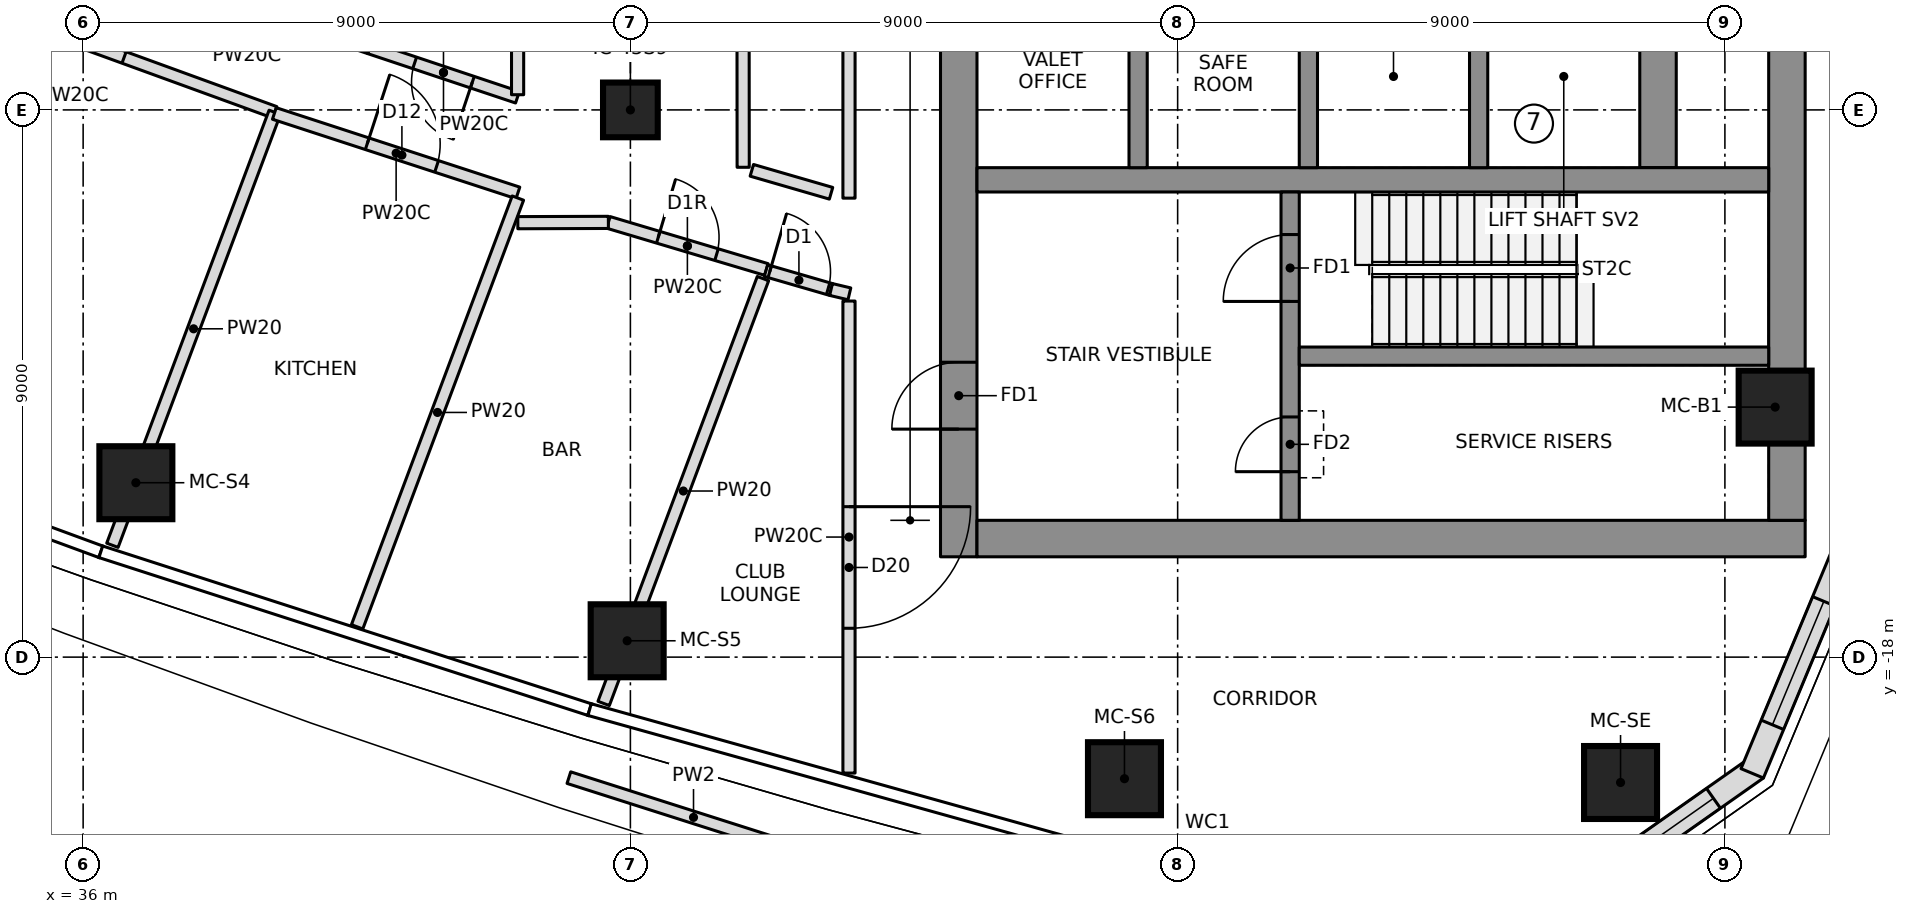
"""IFC4 building model, lengths in metres.
Left out: names, types, materials, properties, quantities, classifications, styles, units other than length and angle.
Written with IfcOpenShell. Run it as: python <this file> out.ifc"""

import sys

from ifc_helpers import new_model, si_unit, direction, frame, frame_2d, origin, origin_2d, place, context, subcontext, project, spatial, polyline, rectangle, outline, extrude, element, fill, save


model = new_model("IFC4")
c1 = context("Model", 3, precision=1e-05, world=origin(), true_north=direction((0.0, 1.0)))
c2 = subcontext(c1, "Body", "Model", "MODEL_VIEW")
j1 = project(units=[si_unit("LENGTHUNIT", "METRE"), si_unit("PLANEANGLEUNIT", "RADIAN")], contexts=[c1])
p1 = place(None, origin())
s1 = spatial("IfcSite", under=j1, at=p1, CompositionType="ELEMENT")
p2 = place(p1, origin())
s2 = spatial("IfcBuilding", under=s1, at=p2, CompositionType="ELEMENT")
p3 = place(p2, frame((0.0, 0.0, 216.2)))
s3 = spatial("IfcBuildingStorey", under=s2, at=p3, CompositionType="ELEMENT", Elevation=216.2)
p4 = place(p3, frame((50.4, -16.35, 0.0), z_axis=(0.0, 0.0, 1.0), x_axis=(0.0, 1.0, 0.0)))
e1 = element("IfcWall", 1, at=p4, inside=s3, PredefinedType="SHEAR", context=c2, shape_type="SweptSolid", body=[
    extrude(rectangle(XDim=9.7, YDim=0.6, at=frame_2d((4.85, 0.0))), origin(), (0.0, 0.0, 1.0), 4.6),
])
p5 = place(p4, frame((2.1, 0.0, 0.0)))
e2 = element("IfcOpeningElement", 2, at=p5, cuts=e1, PredefinedType="OPENING", context=c2, shape_type="SweptSolid", body=[
    extrude(rectangle(XDim=1.1, YDim=2.1, at=frame_2d((0.55, 1.05))), frame((0.0, 0.31, 0.0), z_axis=(0.0, -1.0, 0.0), x_axis=(1.0, 0.0, 0.0)), (0.0, 0.0, 1.0), 0.62),
])
p6 = place(p3, frame((50.7, -16.05, 0.0), z_axis=(0.0, 0.0, 1.0), x_axis=(1.0, 0.0, 0.0)))
e3 = element("IfcWall", 3, at=p6, inside=s3, PredefinedType="SHEAR", context=c2, shape_type="SweptSolid", body=[
    extrude(rectangle(XDim=13.62, YDim=0.6, at=frame_2d((6.81, 0.0))), origin(), (0.0, 0.0, 1.0), 4.6),
])
p7 = place(p3, frame((64.02, -15.75, 0.0), z_axis=(0.0, 0.0, 1.0), x_axis=(0.0, 1.0, 0.0)))
e4 = element("IfcWall", 4, at=p7, inside=s3, PredefinedType="SHEAR", context=c2, shape_type="SweptSolid", body=[
    extrude(rectangle(XDim=8.248, YDim=0.6, at=frame_2d((4.124, 0.0))), origin(), (0.0, 0.0, 1.0), 4.6),
])
p8 = place(p3, frame((61.9, -9.95, 0.0), z_axis=(0.0, 0.0, 1.0), x_axis=(0.0, 1.0, 0.0)))
e5 = element("IfcWall", 5, at=p8, inside=s3, PredefinedType="SHEAR", context=c2, shape_type="SweptSolid", body=[
    extrude(rectangle(XDim=19.9, YDim=0.6, at=frame_2d((9.95, 0.0))), origin(), (0.0, 0.0, 1.0), 4.6),
])
p9 = place(p3, frame((50.7, -10.15, 0.0), z_axis=(0.0, 0.0, 1.0), x_axis=(1.0, 0.0, 0.0)))
e6 = element("IfcWall", 6, at=p9, inside=s3, PredefinedType="SHEAR", context=c2, shape_type="SweptSolid", body=[
    extrude(rectangle(XDim=13.02, YDim=0.4, at=frame_2d((6.51, 0.0))), origin(), (0.0, 0.0, 1.0), 4.6),
])
for number, where, z_axis, x_axis in (
    (7, (53.35, -9.95, 0.0), (0.0, 0.0, 1.0), (0.0, 1.0, 0.0)),
    (8, (56.15, -9.95, 0.0), (0.0, 0.0, 1.0), (0.0, 1.0, 0.0)),
    (9, (58.95, -9.95, 0.0), (0.0, 0.0, 1.0), (0.0, 1.0, 0.0)),
):
    element("IfcWall", number, at=place(p3, frame(where, z_axis=z_axis, x_axis=x_axis)), inside=s3, PredefinedType="SHEAR", context=c2, shape_type="SweptSolid", body=[
        extrude(rectangle(XDim=3.0, YDim=0.3, at=frame_2d((1.5, 0.0))), origin(), (0.0, 0.0, 1.0), 4.6),
    ])
p10 = place(p3, frame((55.85, -15.75, 0.0), z_axis=(0.0, 0.0, 1.0), x_axis=(0.0, 1.0, 0.0)))
e10 = element("IfcWall", 10, at=p10, inside=s3, PredefinedType="SHEAR", context=c2, shape_type="SweptSolid", body=[
    extrude(rectangle(XDim=5.4, YDim=0.3, at=frame_2d((2.7, 0.0))), origin(), (0.0, 0.0, 1.0), 4.6),
])
p11 = place(p10, frame((3.6, 0.0, 0.0)))
e11 = element("IfcOpeningElement", 11, at=p11, cuts=e10, PredefinedType="OPENING", context=c2, shape_type="SweptSolid", body=[
    extrude(rectangle(XDim=1.1, YDim=2.1, at=frame_2d((0.55, 1.05))), frame((0.0, 0.16, 0.0), z_axis=(0.0, -1.0, 0.0), x_axis=(1.0, 0.0, 0.0)), (0.0, 0.0, 1.0), 0.32),
])
p12 = place(p10, frame((0.8, 0.0, 0.0)))
e12 = element("IfcOpeningElement", 12, at=p12, cuts=e10, PredefinedType="OPENING", context=c2, shape_type="SweptSolid", body=[
    extrude(rectangle(XDim=0.9, YDim=2.1, at=frame_2d((0.45, 1.05))), frame((0.0, 0.16, 0.0), z_axis=(0.0, -1.0, 0.0), x_axis=(1.0, 0.0, 0.0)), (0.0, 0.0, 1.0), 0.32),
])
p13 = place(p3, frame((56.0, -13.05, 0.0), z_axis=(0.0, 0.0, 1.0), x_axis=(1.0, 0.0, 0.0)))
e13 = element("IfcWall", 13, at=p13, inside=s3, PredefinedType="SHEAR", context=c2, shape_type="SweptSolid", body=[
    extrude(rectangle(XDim=7.72, YDim=0.3, at=frame_2d((3.86, 0.0))), origin(), (0.0, 0.0, 1.0), 4.6),
])
for number, where, z_axis, x_axis in (
    (14, (36.867, -15.132, 0.0), (0.0, 0.0, 1.0), (1.0, 0.0, 0.0)),
    (15, (44.947, -17.731, 0.0), (0.0, 0.0, 1.0), (1.0, 0.0, 0.0)),
    (16, (53.125, -20.0, 0.0), (0.0, 0.0, 1.0), (1.0, 0.0, 0.0)),
    (17, (61.284, -20.062, 0.0), (0.0, 0.0, 1.0), (1.0, 0.0, 0.0)),
    (18, (63.826, -13.888, 0.0), (0.0, 0.0, 1.0), (1.0, 0.0, 0.0)),
):
    element("IfcColumn", number, at=place(p3, frame(where, z_axis=z_axis, x_axis=x_axis)), inside=s3, PredefinedType="COLUMN", context=c2, shape_type="SweptSolid", body=[
        extrude(rectangle(XDim=1.2, YDim=1.2, at=origin_2d()), origin(), (0.0, 0.0, 1.0), 4.6),
    ])
p14 = place(p3, frame((45.0, -9.0, 0.0), z_axis=(0.0, 0.0, 1.0), x_axis=(1.0, 0.0, 0.0)))
e19 = element("IfcColumn", 19, at=p14, inside=s3, PredefinedType="COLUMN", context=c2, shape_type="SweptSolid", body=[
    extrude(rectangle(XDim=0.9, YDim=0.9, at=origin_2d()), origin(), (0.0, 0.0, 1.0), 4.6),
])
p15 = place(p3, frame((60.352, -22.052, 0.0), z_axis=(0.0, 0.0, 1.0), x_axis=(0.817942545532, 0.575299915009, 0.0)))
e20 = element("IfcWall", 20, at=p15, inside=s3, PredefinedType="NOTDEFINED", context=c2, shape_type="SweptSolid", body=[
    extrude(outline(polyline([(-0.058, -0.2), (3.871, -0.2), (3.756, 0.2), (0.058, 0.2), (-0.058, -0.2)])), origin(), (0.0, 0.0, 1.0), 4.3),
])
p16 = place(p15, frame((0.807, 0.0, 0.6)))
e21 = element("IfcOpeningElement", 21, at=p16, cuts=e20, PredefinedType="OPENING", context=c2, shape_type="SweptSolid", body=[
    extrude(outline(polyline([(0.0, 1.35), (0.084, 1.771), (0.322, 2.128), (0.679, 2.366), (1.1, 2.45), (1.521, 2.366), (1.878, 2.128), (2.116, 1.771), (2.2, 1.35), (2.2, 1.1), (2.116, 0.679), (1.878, 0.322), (1.521, 0.084), (1.1, 0.0), (0.679, 0.084), (0.322, 0.322), (0.084, 0.679), (0.0, 1.1), (0.0, 1.35)])), frame((0.0, 0.21, 0.0), z_axis=(0.0, -1.0, 0.0), x_axis=(1.0, 0.0, 0.0)), (0.0, 0.0, 1.0), 0.42),
])
p17 = place(p3, frame((63.471, -19.858, 0.0), z_axis=(0.0, 0.0, 1.0), x_axis=(0.3844335483, 0.923152667191, 0.0)))
e22 = element("IfcWall", 22, at=p17, inside=s3, PredefinedType="NOTDEFINED", context=c2, shape_type="SweptSolid", body=[
    extrude(outline(polyline([(-0.058, -0.2), (3.843, -0.2), (3.784, 0.2), (0.058, 0.2), (-0.058, -0.2)])), origin(), (0.0, 0.0, 1.0), 4.3),
])
p18 = place(p17, frame((0.807, 0.0, 0.6)))
e23 = element("IfcOpeningElement", 23, at=p18, cuts=e22, PredefinedType="OPENING", context=c2, shape_type="SweptSolid", body=[
    extrude(outline(polyline([(0.0, 1.35), (0.084, 1.771), (0.322, 2.128), (0.679, 2.366), (1.1, 2.45), (1.521, 2.366), (1.878, 2.128), (2.116, 1.771), (2.2, 1.35), (2.2, 1.1), (2.116, 0.679), (1.878, 0.322), (1.521, 0.084), (1.1, 0.0), (0.679, 0.084), (0.322, 0.322), (0.084, 0.679), (0.0, 1.1), (0.0, 1.35)])), frame((0.0, 0.21, 0.0), z_axis=(0.0, -1.0, 0.0), x_axis=(1.0, 0.0, 0.0)), (0.0, 0.0, 1.0), 0.42),
])
p19 = place(p3, frame((43.988, -19.982, 0.0), z_axis=(0.0, 0.0, 1.0), x_axis=(0.952727369543, -0.303826528341, 0.0)))
e24 = element("IfcWall", 24, at=p19, inside=s3, PredefinedType="PARAPET", context=c2, shape_type="SweptSolid", body=[
    extrude(rectangle(XDim=4.303, YDim=0.2, at=frame_2d((2.151, 0.0))), origin(), (0.0, 0.0, 1.0), 1.1),
])
p20 = place(p3, frame((31.176, -6.137, 0.0), z_axis=(0.0, 0.0, 1.0), x_axis=(0.939697645913, -0.342006336585, 0.0)))
e25 = element("IfcWall", 25, at=p20, inside=s3, PredefinedType="PARTITIONING", context=c2, shape_type="SweptSolid", body=[
    extrude(rectangle(XDim=8.488, YDim=0.2, at=frame_2d((4.244, 0.0))), origin(), (0.0, 0.0, 1.0), 4.3),
])
p21 = place(p20, frame((3.85, 0.0, 0.0)))
e26 = element("IfcOpeningElement", 26, at=p21, cuts=e25, PredefinedType="OPENING", context=c2, shape_type="SweptSolid", body=[
    extrude(rectangle(XDim=2.0, YDim=2.4, at=frame_2d((1.0, 1.2))), frame((0.0, 0.11, 0.0), z_axis=(0.0, -1.0, 0.0), x_axis=(1.0, 0.0, 0.0)), (0.0, 0.0, 1.0), 0.22),
])
p22 = place(p3, frame((36.481, -16.161, 0.0), z_axis=(0.0, 0.0, 1.0), x_axis=(0.351133995718, 0.936325219703, 0.0)))
e27 = element("IfcWall", 27, at=p22, inside=s3, PredefinedType="PARTITIONING", context=c2, shape_type="SweptSolid", body=[
    extrude(rectangle(XDim=7.605, YDim=0.2, at=frame_2d((3.803, 0.0))), origin(), (0.0, 0.0, 1.0), 4.3),
])
p23 = place(p3, frame((39.145, -9.059, 0.0), z_axis=(0.0, 0.0, 1.0), x_axis=(0.950709044073, -0.310084365161, 0.0)))
e28 = element("IfcWall", 28, at=p23, inside=s3, PredefinedType="PARTITIONING", context=c2, shape_type="SweptSolid", body=[
    extrude(rectangle(XDim=4.213, YDim=0.2, at=frame_2d((2.106, 0.0))), origin(), (0.0, 0.0, 1.0), 4.3),
])
p24 = place(p23, frame((1.607, 0.0, 0.0)))
e29 = element("IfcOpeningElement", 29, at=p24, cuts=e28, PredefinedType="OPENING", context=c2, shape_type="SweptSolid", body=[
    extrude(rectangle(XDim=1.2, YDim=2.1, at=frame_2d((0.6, 1.05))), frame((0.0, 0.11, 0.0), z_axis=(0.0, -1.0, 0.0), x_axis=(1.0, 0.0, 0.0)), (0.0, 0.0, 1.0), 0.22),
])
p25 = place(p3, frame((40.506, -17.501, 0.0), z_axis=(0.0, 0.0, 1.0), x_axis=(0.351119888923, 0.936330509811, 0.0)))
e30 = element("IfcWall", 30, at=p25, inside=s3, PredefinedType="PARTITIONING", context=c2, shape_type="SweptSolid", body=[
    extrude(rectangle(XDim=7.531, YDim=0.2, at=frame_2d((3.766, 0.0))), origin(), (0.0, 0.0, 1.0), 4.3),
])
p26 = place(p3, frame((44.638, -10.85, 0.0), z_axis=(0.0, 0.0, 1.0), x_axis=(0.95835737874, -0.285571592801, 0.0)))
e31 = element("IfcWall", 31, at=p26, inside=s3, PredefinedType="PARTITIONING", context=c2, shape_type="SweptSolid", body=[
    extrude(rectangle(XDim=2.712, YDim=0.2, at=frame_2d((1.356, 0.0))), origin(), (0.0, 0.0, 1.0), 4.3),
])
p27 = place(p26, frame((0.856, 0.0, 0.0)))
e32 = element("IfcOpeningElement", 32, at=p27, cuts=e31, PredefinedType="OPENING", context=c2, shape_type="SweptSolid", body=[
    extrude(rectangle(XDim=1.0, YDim=2.1, at=frame_2d((0.5, 1.05))), frame((0.0, 0.11, 0.0), z_axis=(0.0, -1.0, 0.0), x_axis=(1.0, 0.0, 0.0)), (0.0, 0.0, 1.0), 0.22),
])
p28 = place(p3, frame((44.56, -18.762, 0.0), z_axis=(0.0, 0.0, 1.0), x_axis=(0.351109100247, 0.936334555447, 0.0)))
e33 = element("IfcWall", 33, at=p28, inside=s3, PredefinedType="PARTITIONING", context=c2, shape_type="SweptSolid", body=[
    extrude(rectangle(XDim=7.462, YDim=0.2, at=frame_2d((3.731, 0.0))), origin(), (0.0, 0.0, 1.0), 4.3),
])
p29 = place(p3, frame((40.709, -7.979, 0.0), z_axis=(0.0, 0.0, 1.0), x_axis=(-0.94846740352, 0.316874714137, 0.0)))
e34 = element("IfcWall", 34, at=p29, inside=s3, PredefinedType="PARTITIONING", context=c2, shape_type="SweptSolid", body=[
    extrude(rectangle(XDim=1.472, YDim=0.2, at=frame_2d((0.736, 0.0))), origin(), (0.0, 0.0, 1.0), 4.3),
])
p30 = place(p3, frame((43.143, -8.792, 0.0), z_axis=(0.0, 0.0, 1.0), x_axis=(-0.948473756095, 0.316855699016, 0.0)))
e35 = element("IfcWall", 35, at=p30, inside=s3, PredefinedType="PARTITIONING", context=c2, shape_type="SweptSolid", body=[
    extrude(rectangle(XDim=2.566, YDim=0.2, at=frame_2d((1.283, 0.0))), origin(), (0.0, 0.0, 1.0), 4.3),
])
p31 = place(p30, frame((0.783, 0.0, 0.0)))
e36 = element("IfcOpeningElement", 36, at=p31, cuts=e35, PredefinedType="OPENING", context=c2, shape_type="SweptSolid", body=[
    extrude(rectangle(XDim=1.0, YDim=2.1, at=frame_2d((0.5, 1.05))), frame((0.0, 0.11, 0.0), z_axis=(0.0, -1.0, 0.0), x_axis=(1.0, 0.0, 0.0)), (0.0, 0.0, 1.0), 0.22),
])
p32 = place(p3, frame((47.23, -11.643, 0.0), z_axis=(0.0, 0.0, 1.0), x_axis=(0.960450233741, -0.278451698696, 0.0)))
e37 = element("IfcWall", 37, at=p32, inside=s3, PredefinedType="PARTITIONING", context=c2, shape_type="SweptSolid", body=[
    extrude(rectangle(XDim=1.115, YDim=0.2, at=frame_2d((0.557, 0.0))), origin(), (0.0, 0.0, 1.0), 4.3),
])
p33 = place(p32, frame((0.064, 0.0, 0.0)))
e38 = element("IfcOpeningElement", 38, at=p33, cuts=e37, PredefinedType="OPENING", context=c2, shape_type="SweptSolid", body=[
    extrude(rectangle(XDim=1.0, YDim=2.1, at=frame_2d((0.5, 1.05))), frame((0.0, 0.11, 0.0), z_axis=(0.0, -1.0, 0.0), x_axis=(1.0, 0.0, 0.0)), (0.0, 0.0, 1.0), 0.22),
])
p34 = place(p3, frame((48.3, -10.371, 0.0), z_axis=(0.0, 0.0, 1.0), x_axis=(-0.960450321583, 0.278451395706, 0.0)))
e39 = element("IfcWall", 39, at=p34, inside=s3, PredefinedType="PARTITIONING", context=c2, shape_type="SweptSolid", body=[
    extrude(rectangle(XDim=1.356, YDim=0.2, at=frame_2d((0.678, 0.0))), origin(), (0.0, 0.0, 1.0), 4.3),
])
p35 = place(p3, frame((43.146, -7.148, 0.0), z_axis=(0.0, 0.0, 1.0), x_axis=(-0.000304785112, -0.999999953553, 0.0)))
e40 = element("IfcWall", 40, at=p35, inside=s3, PredefinedType="PARTITIONING", context=c2, shape_type="SweptSolid", body=[
    extrude(rectangle(XDim=1.602, YDim=0.2, at=frame_2d((0.801, 0.0))), origin(), (0.0, 0.0, 1.0), 4.3),
])
p36 = place(p3, frame((48.595, 10.451, 0.0), z_axis=(0.0, 0.0, 1.0), x_axis=(0.0, -1.0, 0.0)))
e41 = element("IfcWall", 41, at=p36, inside=s3, PredefinedType="PARTITIONING", context=c2, shape_type="SweptSolid", body=[
    extrude(rectangle(XDim=20.903, YDim=0.2, at=frame_2d((10.451, 0.0))), origin(), (0.0, 0.0, 1.0), 4.3),
])
p37 = place(p3, frame((46.855, -9.944, 0.0), z_axis=(0.0, 0.0, 1.0), x_axis=(-0.000785271549, 0.999999691674, 0.0)))
e42 = element("IfcWall", 42, at=p37, inside=s3, PredefinedType="PARTITIONING", context=c2, shape_type="SweptSolid", body=[
    extrude(rectangle(XDim=2.798, YDim=0.2, at=frame_2d((1.399, 0.0))), origin(), (0.0, 0.0, 1.0), 4.3),
])
p38 = place(p3, frame((43.148, -10.855, 0.0), z_axis=(0.0, 0.0, 1.0), x_axis=(0.999995150779, 0.003114228465, 0.0)))
e43 = element("IfcWall", 43, at=p38, inside=s3, PredefinedType="PARTITIONING", context=c2, shape_type="SweptSolid", body=[
    extrude(rectangle(XDim=1.49, YDim=0.2, at=frame_2d((0.745, 0.0))), origin(), (0.0, 0.0, 1.0), 4.3),
])
p39 = place(p3, frame((48.3, -11.954, 0.0), z_axis=(0.0, 0.0, 1.0), x_axis=(0.972991873737, -0.230839367615, 0.0)))
e44 = element("IfcWall", 44, at=p39, inside=s3, PredefinedType="PARTITIONING", context=c2, shape_type="SweptSolid", body=[
    extrude(rectangle(XDim=0.31, YDim=0.2, at=frame_2d((0.155, 0.0))), origin(), (0.0, 0.0, 1.0), 4.3),
])
p40 = place(p3, frame((48.595, -12.144, 0.0), z_axis=(0.0, 0.0, 1.0), x_axis=(0.0, -1.0, 0.0)))
e45 = element("IfcWall", 45, at=p40, inside=s3, PredefinedType="PARTITIONING", context=c2, shape_type="SweptSolid", body=[
    extrude(rectangle(XDim=7.763, YDim=0.2, at=frame_2d((3.882, 0.0))), origin(), (0.0, 0.0, 1.0), 4.3),
])
p41 = place(p40, frame((3.382, 0.0, 0.0)))
e46 = element("IfcOpeningElement", 46, at=p41, cuts=e45, PredefinedType="OPENING", context=c2, shape_type="SweptSolid", body=[
    extrude(rectangle(XDim=2.0, YDim=2.4, at=frame_2d((1.0, 1.2))), frame((0.0, 0.11, 0.0), z_axis=(0.0, -1.0, 0.0), x_axis=(1.0, 0.0, 0.0)), (0.0, 0.0, 1.0), 0.22),
])
p42 = place(p16, origin())
e47 = element("IfcWindow", 47, at=p42, inside=s3, PartitioningType="SINGLE_PANEL", PredefinedType="WINDOW", context=c2, shape_type="SweptSolid", body=[
    extrude(outline(polyline([(0.0, 1.35), (0.084, 1.771), (0.322, 2.128), (0.679, 2.366), (1.1, 2.45), (1.521, 2.366), (1.878, 2.128), (2.116, 1.771), (2.2, 1.35), (2.2, 1.1), (2.116, 0.679), (1.878, 0.322), (1.521, 0.084), (1.1, 0.0), (0.679, 0.084), (0.322, 0.322), (0.084, 0.679), (0.0, 1.1), (0.0, 1.35)])), frame((0.0, 0.17, 0.0), z_axis=(0.0, -1.0, 0.0), x_axis=(1.0, 0.0, 0.0)), (0.0, 0.0, 1.0), 0.06),
])
fill(e21, e47)
p43 = place(p18, origin())
e48 = element("IfcWindow", 48, at=p43, inside=s3, PartitioningType="SINGLE_PANEL", PredefinedType="WINDOW", context=c2, shape_type="SweptSolid", body=[
    extrude(outline(polyline([(0.0, 1.35), (0.084, 1.771), (0.322, 2.128), (0.679, 2.366), (1.1, 2.45), (1.521, 2.366), (1.878, 2.128), (2.116, 1.771), (2.2, 1.35), (2.2, 1.1), (2.116, 0.679), (1.878, 0.322), (1.521, 0.084), (1.1, 0.0), (0.679, 0.084), (0.322, 0.322), (0.084, 0.679), (0.0, 1.1), (0.0, 1.35)])), frame((0.0, 0.17, 0.0), z_axis=(0.0, -1.0, 0.0), x_axis=(1.0, 0.0, 0.0)), (0.0, 0.0, 1.0), 0.06),
])
fill(e23, e48)
p44 = place(p21, origin())
e49 = element("IfcDoor", 49, at=p44, inside=s3, OperationType="DOUBLE_DOOR_SINGLE_SWING", PredefinedType="DOOR", context=c2, shape_type="SweptSolid", body=[
    extrude(rectangle(XDim=2.0, YDim=2.4, at=frame_2d((1.0, 1.2))), frame((0.0, 0.025, 0.0), z_axis=(0.0, -1.0, 0.0), x_axis=(1.0, 0.0, 0.0)), (0.0, 0.0, 1.0), 0.05),
])
fill(e26, e49)
p45 = place(p24, origin())
e50 = element("IfcDoor", 50, at=p45, inside=s3, OperationType="SINGLE_SWING_RIGHT", PredefinedType="DOOR", context=c2, shape_type="SweptSolid", body=[
    extrude(rectangle(XDim=1.2, YDim=2.1, at=frame_2d((0.6, 1.05))), frame((0.0, 0.025, 0.0), z_axis=(0.0, -1.0, 0.0), x_axis=(1.0, 0.0, 0.0)), (0.0, 0.0, 1.0), 0.05),
])
fill(e29, e50)
p46 = place(p27, origin())
e51 = element("IfcDoor", 51, at=p46, inside=s3, OperationType="SINGLE_SWING_RIGHT", PredefinedType="DOOR", context=c2, shape_type="SweptSolid", body=[
    extrude(rectangle(XDim=1.0, YDim=2.1, at=frame_2d((0.5, 1.05))), frame((0.0, 0.025, 0.0), z_axis=(0.0, -1.0, 0.0), x_axis=(1.0, 0.0, 0.0)), (0.0, 0.0, 1.0), 0.05),
])
fill(e32, e51)
p47 = place(p33, origin())
e52 = element("IfcDoor", 52, at=p47, inside=s3, OperationType="SINGLE_SWING_LEFT", PredefinedType="DOOR", context=c2, shape_type="SweptSolid", body=[
    extrude(rectangle(XDim=1.0, YDim=2.1, at=frame_2d((0.5, 1.05))), frame((0.0, 0.025, 0.0), z_axis=(0.0, -1.0, 0.0), x_axis=(1.0, 0.0, 0.0)), (0.0, 0.0, 1.0), 0.05),
])
fill(e38, e52)
p48 = place(p31, origin())
e53 = element("IfcDoor", 53, at=p48, inside=s3, OperationType="SINGLE_SWING_LEFT", PredefinedType="DOOR", context=c2, shape_type="SweptSolid", body=[
    extrude(rectangle(XDim=1.0, YDim=2.1, at=frame_2d((0.5, 1.05))), frame((0.0, 0.025, 0.0), z_axis=(0.0, -1.0, 0.0), x_axis=(1.0, 0.0, 0.0)), (0.0, 0.0, 1.0), 0.05),
])
fill(e36, e53)
p49 = place(p41, origin())
e54 = element("IfcDoor", 54, at=p49, inside=s3, OperationType="DOUBLE_DOOR_SINGLE_SWING", PredefinedType="DOOR", context=c2, shape_type="SweptSolid", body=[
    extrude(rectangle(XDim=2.0, YDim=2.4, at=frame_2d((1.0, 1.2))), frame((0.0, 0.025, 0.0), z_axis=(0.0, -1.0, 0.0), x_axis=(1.0, 0.0, 0.0)), (0.0, 0.0, 1.0), 0.05),
])
fill(e46, e54)
p50 = place(p11, origin())
e55 = element("IfcDoor", 55, at=p50, inside=s3, OperationType="SINGLE_SWING_RIGHT", PredefinedType="DOOR", context=c2, shape_type="SweptSolid", body=[
    extrude(rectangle(XDim=1.1, YDim=2.1, at=frame_2d((0.55, 1.05))), frame((0.0, 0.025, 0.0), z_axis=(0.0, -1.0, 0.0), x_axis=(1.0, 0.0, 0.0)), (0.0, 0.0, 1.0), 0.05),
])
fill(e11, e55)
p51 = place(p5, origin())
e56 = element("IfcDoor", 56, at=p51, inside=s3, OperationType="SINGLE_SWING_RIGHT", PredefinedType="DOOR", context=c2, shape_type="SweptSolid", body=[
    extrude(rectangle(XDim=1.1, YDim=2.1, at=frame_2d((0.55, 1.05))), frame((0.0, 0.025, 0.0), z_axis=(0.0, -1.0, 0.0), x_axis=(1.0, 0.0, 0.0)), (0.0, 0.0, 1.0), 0.05),
])
fill(e2, e56)
p52 = place(p12, origin())
e57 = element("IfcDoor", 57, at=p52, inside=s3, OperationType="SINGLE_SWING_LEFT", PredefinedType="DOOR", context=c2, shape_type="SweptSolid", body=[
    extrude(rectangle(XDim=0.9, YDim=2.1, at=frame_2d((0.45, 1.05))), frame((0.0, 0.025, 0.0), z_axis=(0.0, -1.0, 0.0), x_axis=(1.0, 0.0, 0.0)), (0.0, 0.0, 1.0), 0.05),
])
fill(e12, e57)
save(model, sys.argv[1])
